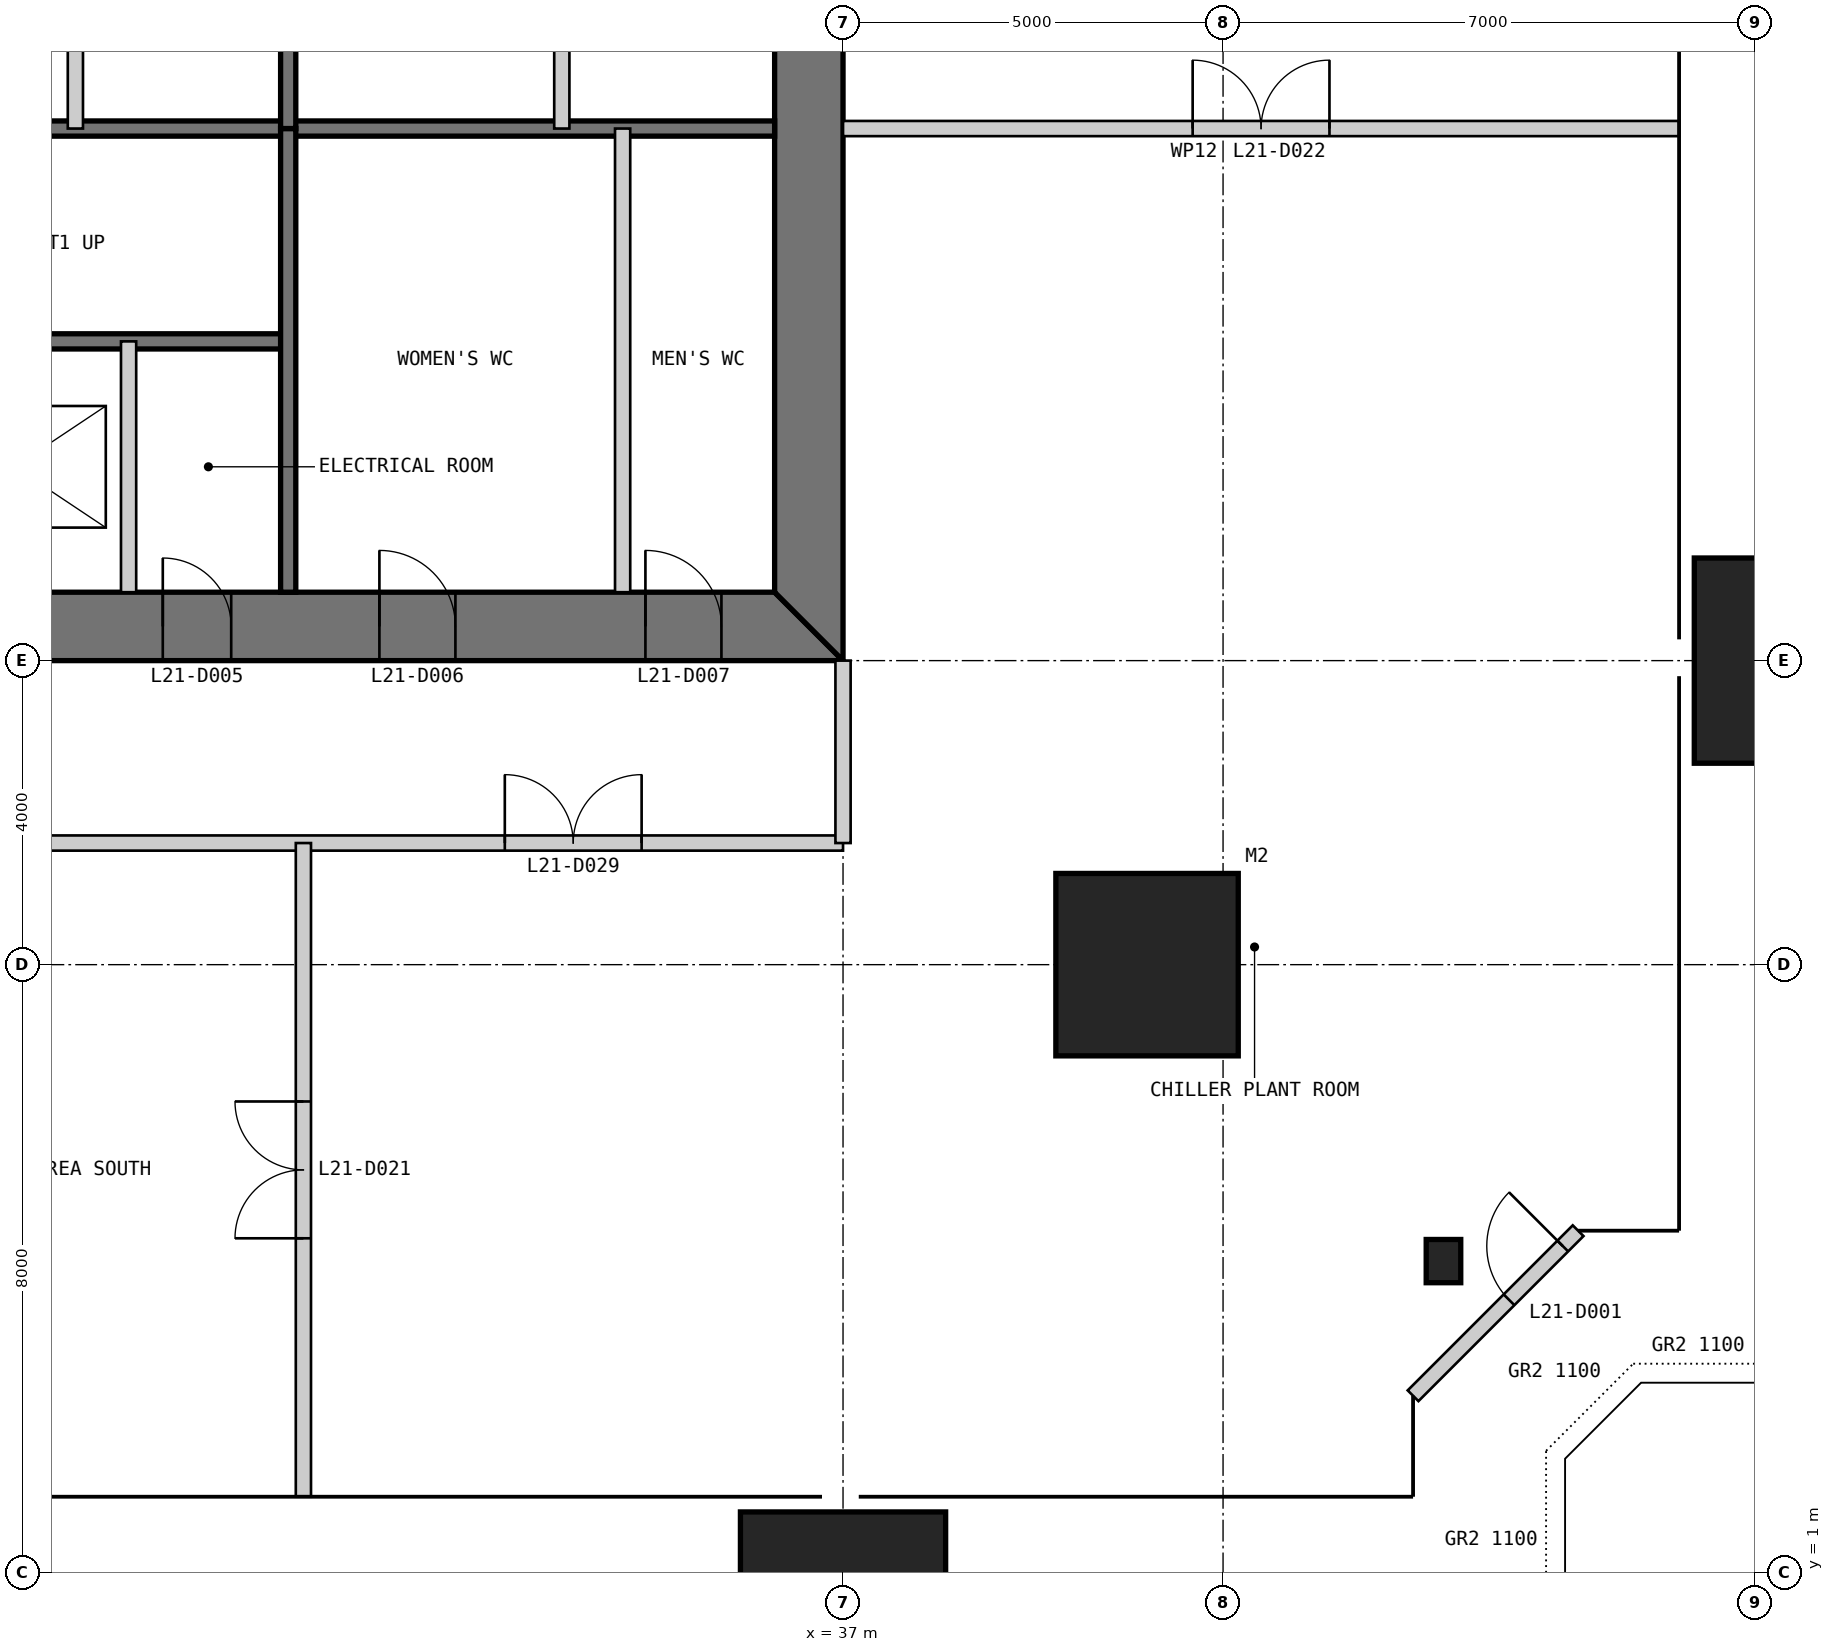
"""IFC4 building model, lengths in metres.
Left out: names, types, materials, properties, quantities, classifications, styles, units other than length and angle.
Written with IfcOpenShell. Run it as: python <this file> out.ifc"""

import sys

from ifc_helpers import new_model, si_unit, direction, frame, frame_2d, origin, origin_2d, place, context, subcontext, project, spatial, polyline, rectangle, i_section, outline, extrude, element, fill, save


model = new_model("IFC4")
c1 = context("Model", 3, precision=1e-05, world=origin(), true_north=direction((0.0, 1.0)))
c2 = subcontext(c1, "Body", "Model", "MODEL_VIEW")
j1 = project(units=[si_unit("LENGTHUNIT", "METRE"), si_unit("PLANEANGLEUNIT", "RADIAN")], contexts=[c1])
p1 = place(None, origin())
s1 = spatial("IfcSite", under=j1, at=p1, CompositionType="ELEMENT")
p2 = place(p1, origin())
s2 = spatial("IfcBuilding", under=s1, at=p2, CompositionType="ELEMENT")
p3 = place(p2, frame((0.0, 0.0, 91.0)))
s3 = spatial("IfcBuildingStorey", under=s2, at=p3, CompositionType="ELEMENT", Elevation=91.0)
p4 = place(p3, frame((41.0, 9.0, 0.0), z_axis=(0.0, 0.0, 1.0), x_axis=(1.0, 0.0, 0.0)))
e1 = element("IfcColumn", 1, at=p4, inside=s3, PredefinedType="COLUMN", context=c2, shape_type="SweptSolid", body=[
    extrude(rectangle(XDim=2.4, YDim=2.4, at=origin_2d()), origin(), (0.0, 0.0, 1.0), 6.0),
])
p5 = place(p3, frame((37.0, 1.0, 0.0), z_axis=(0.0, 0.0, 1.0), x_axis=(1.0, 0.0, 0.0)))
e2 = element("IfcColumn", 2, at=p5, inside=s3, PredefinedType="COLUMN", context=c2, shape_type="SweptSolid", body=[
    extrude(rectangle(XDim=2.7, YDim=1.6, at=origin_2d()), origin(), (0.0, 0.0, 1.0), 6.0),
])
p6 = place(p3, frame((49.0, 13.0, 0.0), z_axis=(0.0, 0.0, 1.0), x_axis=(1.0, 0.0, 0.0)))
e3 = element("IfcColumn", 3, at=p6, inside=s3, PredefinedType="COLUMN", context=c2, shape_type="SweptSolid", body=[
    extrude(rectangle(XDim=1.6, YDim=2.7, at=origin_2d()), origin(), (0.0, 0.0, 1.0), 6.0),
])
p7 = place(p3, frame((44.9, 5.1, 0.0), z_axis=(0.0, 0.0, 1.0), x_axis=(1.0, 0.0, 0.0)))
e4 = element("IfcColumn", 4, at=p7, inside=s3, PredefinedType="COLUMN", context=c2, shape_type="SweptSolid", body=[
    extrude(i_section(OverallWidth=0.455, OverallDepth=0.569, WebThickness=0.078, FlangeThickness=0.125, at=origin_2d()), origin(), (0.0, 0.0, 1.0), 4.6),
])
p8 = place(p3, frame((13.0, 13.45, 0.0), z_axis=(0.0, 0.0, 1.0), x_axis=(1.0, 0.0, 0.0)))
e5 = element("IfcWall", 5, at=p8, inside=s3, PredefinedType="SHEAR", context=c2, shape_type="SweptSolid", body=[
    extrude(outline(polyline([(0.0, -0.45), (24.0, -0.45), (23.1, 0.45), (0.9, 0.45), (0.0, -0.45)])), origin(), (0.0, 0.0, 1.0), 6.0),
])
p9 = place(p8, frame((4.9, 0.0, 0.0)))
e6 = element("IfcOpeningElement", 6, at=p9, cuts=e5, PredefinedType="OPENING", context=c2, shape_type="SweptSolid", body=[
    extrude(rectangle(XDim=1.0, YDim=2.2, at=frame_2d((0.5, 1.1))), frame((0.0, 0.46, 0.0), z_axis=(0.0, -1.0, 0.0), x_axis=(1.0, 0.0, 0.0)), (0.0, 0.0, 1.0), 0.92),
])
p10 = place(p8, frame((8.9, 0.0, 0.0)))
e7 = element("IfcOpeningElement", 7, at=p10, cuts=e5, PredefinedType="OPENING", context=c2, shape_type="SweptSolid", body=[
    extrude(rectangle(XDim=1.1, YDim=2.2, at=frame_2d((0.55, 1.1))), frame((0.0, 0.46, 0.0), z_axis=(0.0, -1.0, 0.0), x_axis=(1.0, 0.0, 0.0)), (0.0, 0.0, 1.0), 0.92),
])
p11 = place(p8, frame((15.05, 0.0, 0.0)))
e8 = element("IfcOpeningElement", 8, at=p11, cuts=e5, PredefinedType="OPENING", context=c2, shape_type="SweptSolid", body=[
    extrude(rectangle(XDim=0.9, YDim=2.2, at=frame_2d((0.45, 1.1))), frame((0.0, 0.46, 0.0), z_axis=(0.0, -1.0, 0.0), x_axis=(1.0, 0.0, 0.0)), (0.0, 0.0, 1.0), 0.92),
])
p12 = place(p8, frame((17.9, 0.0, 0.0)))
e9 = element("IfcOpeningElement", 9, at=p12, cuts=e5, PredefinedType="OPENING", context=c2, shape_type="SweptSolid", body=[
    extrude(rectangle(XDim=1.0, YDim=2.2, at=frame_2d((0.5, 1.1))), frame((0.0, 0.46, 0.0), z_axis=(0.0, -1.0, 0.0), x_axis=(1.0, 0.0, 0.0)), (0.0, 0.0, 1.0), 0.92),
])
p13 = place(p8, frame((21.4, 0.0, 0.0)))
e10 = element("IfcOpeningElement", 10, at=p13, cuts=e5, PredefinedType="OPENING", context=c2, shape_type="SweptSolid", body=[
    extrude(rectangle(XDim=1.0, YDim=2.2, at=frame_2d((0.5, 1.1))), frame((0.0, 0.46, 0.0), z_axis=(0.0, -1.0, 0.0), x_axis=(1.0, 0.0, 0.0)), (0.0, 0.0, 1.0), 0.92),
])
p14 = place(p3, frame((36.55, 13.9, 0.0), z_axis=(0.0, 0.0, 1.0), x_axis=(0.0, 1.0, 0.0)))
e11 = element("IfcWall", 11, at=p14, inside=s3, PredefinedType="SHEAR", context=c2, shape_type="SweptSolid", body=[
    extrude(outline(polyline([(-0.9, -0.45), (23.1, -0.45), (22.2, 0.45), (0.0, 0.45), (-0.9, -0.45)])), origin(), (0.0, 0.0, 1.0), 6.0),
])
p15 = place(p14, frame((20.2, 0.0, 0.0)))
e12 = element("IfcOpeningElement", 12, at=p15, cuts=e11, PredefinedType="OPENING", context=c2, shape_type="SweptSolid", body=[
    extrude(rectangle(XDim=1.0, YDim=2.2, at=frame_2d((0.5, 1.1))), frame((0.0, 0.46, 0.0), z_axis=(0.0, -1.0, 0.0), x_axis=(1.0, 0.0, 0.0)), (0.0, 0.0, 1.0), 0.92),
])
p16 = place(p14, frame((17.25, 0.0, 0.0)))
e13 = element("IfcOpeningElement", 13, at=p16, cuts=e11, PredefinedType="OPENING", context=c2, shape_type="SweptSolid", body=[
    extrude(rectangle(XDim=0.9, YDim=2.2, at=frame_2d((0.45, 1.1))), frame((0.0, 0.46, 0.0), z_axis=(0.0, -1.0, 0.0), x_axis=(1.0, 0.0, 0.0)), (0.0, 0.0, 1.0), 0.92),
])
p17 = place(p3, frame((44.5, 3.328, 0.0), z_axis=(0.0, 0.0, 1.0), x_axis=(0.707106781187, 0.707106781187, 0.0)))
e14 = element("IfcWall", 14, at=p17, inside=s3, PredefinedType="SOLIDWALL", context=c2, shape_type="SweptSolid", body=[
    extrude(rectangle(XDim=3.071, YDim=0.2, at=frame_2d((1.536, 0.0))), origin(), (0.0, 0.0, 1.0), 4.6),
])
p18 = place(p17, frame((1.786, 0.0, 0.0)))
e15 = element("IfcOpeningElement", 15, at=p18, cuts=e14, PredefinedType="OPENING", context=c2, shape_type="SweptSolid", body=[
    extrude(rectangle(XDim=1.0, YDim=2.2, at=frame_2d((0.5, 1.1))), frame((0.0, 0.11, 0.0), z_axis=(0.0, -1.0, 0.0), x_axis=(1.0, 0.0, 0.0)), (0.0, 0.0, 1.0), 0.22),
])
p19 = place(p3, frame((20.3, 17.2, 0.0), z_axis=(0.0, 0.0, 1.0), x_axis=(1.0, 0.0, 0.0)))
e16 = element("IfcWall", 16, at=p19, inside=s3, PredefinedType="SOLIDWALL", context=c2, shape_type="SweptSolid", body=[
    extrude(rectangle(XDim=9.4, YDim=0.2, at=frame_2d((4.7, 0.0))), origin(), (0.0, 0.0, 1.0), 5.8),
])
p20 = place(p19, frame((0.25, 0.0, 0.0)))
e17 = element("IfcOpeningElement", 17, at=p20, cuts=e16, PredefinedType="OPENING", context=c2, shape_type="SweptSolid", body=[
    extrude(rectangle(XDim=1.0, YDim=2.2, at=frame_2d((0.5, 1.1))), frame((0.0, 0.11, 0.0), z_axis=(0.0, -1.0, 0.0), x_axis=(1.0, 0.0, 0.0)), (0.0, 0.0, 1.0), 0.22),
])
p21 = place(p3, frame((20.3, 20.0, 0.0), z_axis=(0.0, 0.0, 1.0), x_axis=(1.0, 0.0, 0.0)))
e18 = element("IfcWall", 18, at=p21, inside=s3, PredefinedType="SOLIDWALL", context=c2, shape_type="SweptSolid", body=[
    extrude(rectangle(XDim=15.8, YDim=0.2, at=frame_2d((7.9, 0.0))), origin(), (0.0, 0.0, 1.0), 5.8),
])
p22 = place(p3, frame((27.6, 13.9, 0.0), z_axis=(0.0, 0.0, 1.0), x_axis=(0.0, 1.0, 0.0)))
e19 = element("IfcWall", 19, at=p22, inside=s3, PredefinedType="PARTITIONING", context=c2, shape_type="SweptSolid", body=[
    extrude(rectangle(XDim=3.3, YDim=0.2, at=frame_2d((1.65, 0.0))), origin(), (0.0, 0.0, 1.0), 5.8),
])
p23 = place(p3, frame((29.7, 13.9, 0.0), z_axis=(0.0, 0.0, 1.0), x_axis=(0.0, 1.0, 0.0)))
e20 = element("IfcWall", 20, at=p23, inside=s3, PredefinedType="SOLIDWALL", context=c2, shape_type="SweptSolid", body=[
    extrude(rectangle(XDim=6.1, YDim=0.2, at=frame_2d((3.05, 0.0))), origin(), (0.0, 0.0, 1.0), 5.8),
])
p24 = place(p3, frame((34.1, 13.9, 0.0), z_axis=(0.0, 0.0, 1.0), x_axis=(0.0, 1.0, 0.0)))
e21 = element("IfcWall", 21, at=p24, inside=s3, PredefinedType="PARTITIONING", context=c2, shape_type="SweptSolid", body=[
    extrude(rectangle(XDim=6.1, YDim=0.2, at=frame_2d((3.05, 0.0))), origin(), (0.0, 0.0, 1.0), 5.8),
])
p25 = place(p3, frame((33.3, 36.1, 0.0), z_axis=(0.0, 0.0, 1.0), x_axis=(0.0, -1.0, 0.0)))
e22 = element("IfcWall", 22, at=p25, inside=s3, PredefinedType="PARTITIONING", context=c2, shape_type="SweptSolid", body=[
    extrude(rectangle(XDim=16.1, YDim=0.2, at=frame_2d((8.05, 0.0))), origin(), (0.0, 0.0, 1.0), 5.8),
])
p26 = place(p25, frame((4.1, 0.0, 0.0)))
e23 = element("IfcOpeningElement", 23, at=p26, cuts=e22, PredefinedType="OPENING", context=c2, shape_type="SweptSolid", body=[
    extrude(rectangle(XDim=0.9, YDim=2.2, at=frame_2d((0.45, 1.1))), frame((0.0, 0.11, 0.0), z_axis=(0.0, -1.0, 0.0), x_axis=(1.0, 0.0, 0.0)), (0.0, 0.0, 1.0), 0.22),
])
p27 = place(p3, frame((29.7, 36.1, 0.0), z_axis=(0.0, 0.0, 1.0), x_axis=(0.0, -1.0, 0.0)))
e24 = element("IfcWall", 24, at=p27, inside=s3, PredefinedType="SOLIDWALL", context=c2, shape_type="SweptSolid", body=[
    extrude(rectangle(XDim=16.1, YDim=0.2, at=frame_2d((8.05, 0.0))), origin(), (0.0, 0.0, 1.0), 5.8),
])
p28 = place(p3, frame((26.9, 30.0, 0.0), z_axis=(0.0, 0.0, 1.0), x_axis=(0.0, -1.0, 0.0)))
e25 = element("IfcWall", 25, at=p28, inside=s3, PredefinedType="PARTITIONING", context=c2, shape_type="SweptSolid", body=[
    extrude(rectangle(XDim=10.0, YDim=0.2, at=frame_2d((5.0, 0.0))), origin(), (0.0, 0.0, 1.0), 5.8),
])
p29 = place(p3, frame((13.0, 10.6, 0.0), z_axis=(0.0, 0.0, 1.0), x_axis=(1.0, 0.0, 0.0)))
e26 = element("IfcWall", 26, at=p29, inside=s3, PredefinedType="PARTITIONING", context=c2, shape_type="SweptSolid", body=[
    extrude(rectangle(XDim=24.0, YDim=0.2, at=frame_2d((12.0, 0.0))), origin(), (0.0, 0.0, 1.0), 5.8),
])
p30 = place(p29, frame((2.8, 0.0, 0.0)))
e27 = element("IfcOpeningElement", 27, at=p30, cuts=e26, PredefinedType="OPENING", context=c2, shape_type="SweptSolid", body=[
    extrude(rectangle(XDim=1.8, YDim=2.4, at=frame_2d((0.9, 1.2))), frame((0.0, 0.11, 0.0), z_axis=(0.0, -1.0, 0.0), x_axis=(1.0, 0.0, 0.0)), (0.0, 0.0, 1.0), 0.22),
])
p31 = place(p29, frame((11.25, 0.0, 0.0)))
e28 = element("IfcOpeningElement", 28, at=p31, cuts=e26, PredefinedType="OPENING", context=c2, shape_type="SweptSolid", body=[
    extrude(rectangle(XDim=1.8, YDim=2.4, at=frame_2d((0.9, 1.2))), frame((0.0, 0.11, 0.0), z_axis=(0.0, -1.0, 0.0), x_axis=(1.0, 0.0, 0.0)), (0.0, 0.0, 1.0), 0.22),
])
p32 = place(p29, frame((19.55, 0.0, 0.0)))
e29 = element("IfcOpeningElement", 29, at=p32, cuts=e26, PredefinedType="OPENING", context=c2, shape_type="SweptSolid", body=[
    extrude(rectangle(XDim=1.8, YDim=2.4, at=frame_2d((0.9, 1.2))), frame((0.0, 0.11, 0.0), z_axis=(0.0, -1.0, 0.0), x_axis=(1.0, 0.0, 0.0)), (0.0, 0.0, 1.0), 0.22),
])
p33 = place(p3, frame((37.0, 10.6, 0.0), z_axis=(0.0, 0.0, 1.0), x_axis=(0.0, 1.0, 0.0)))
e30 = element("IfcWall", 30, at=p33, inside=s3, PredefinedType="PARTITIONING", context=c2, shape_type="SweptSolid", body=[
    extrude(rectangle(XDim=2.4, YDim=0.2, at=frame_2d((1.2, 0.0))), origin(), (0.0, 0.0, 1.0), 4.853),
])
p34 = place(p3, frame((29.9, 2.0, 0.0), z_axis=(0.0, 0.0, 1.0), x_axis=(0.0, 1.0, 0.0)))
e31 = element("IfcWall", 31, at=p34, inside=s3, PredefinedType="PARTITIONING", context=c2, shape_type="SweptSolid", body=[
    extrude(rectangle(XDim=8.6, YDim=0.2, at=frame_2d((4.3, 0.0))), origin(), (0.0, 0.0, 1.0), 5.8),
])
p35 = place(p34, frame((3.4, 0.0, 0.0)))
e32 = element("IfcOpeningElement", 32, at=p35, cuts=e31, PredefinedType="OPENING", context=c2, shape_type="SweptSolid", body=[
    extrude(rectangle(XDim=1.8, YDim=2.4, at=frame_2d((0.9, 1.2))), frame((0.0, 0.11, 0.0), z_axis=(0.0, -1.0, 0.0), x_axis=(1.0, 0.0, 0.0)), (0.0, 0.0, 1.0), 0.22),
])
p36 = place(p3, frame((37.0, 20.0, 0.0), z_axis=(0.0, 0.0, 1.0), x_axis=(1.0, 0.0, 0.0)))
e33 = element("IfcWall", 33, at=p36, inside=s3, PredefinedType="PARTITIONING", context=c2, shape_type="SweptSolid", body=[
    extrude(rectangle(XDim=11.0, YDim=0.2, at=frame_2d((5.5, 0.0))), origin(), (0.0, 0.0, 1.0), 5.8),
])
p37 = place(p36, frame((4.6, 0.0, 0.0)))
e34 = element("IfcOpeningElement", 34, at=p37, cuts=e33, PredefinedType="OPENING", context=c2, shape_type="SweptSolid", body=[
    extrude(rectangle(XDim=1.8, YDim=2.4, at=frame_2d((0.9, 1.2))), frame((0.0, 0.11, 0.0), z_axis=(0.0, -1.0, 0.0), x_axis=(1.0, 0.0, 0.0)), (0.0, 0.0, 1.0), 0.22),
])
p38 = place(p18, origin())
e35 = element("IfcDoor", 35, at=p38, inside=s3, OperationType="SINGLE_SWING_RIGHT", PredefinedType="DOOR", context=c2, shape_type="SweptSolid", body=[
    extrude(rectangle(XDim=1.0, YDim=2.2, at=frame_2d((0.5, 1.1))), frame((0.0, 0.025, 0.0), z_axis=(0.0, -1.0, 0.0), x_axis=(1.0, 0.0, 0.0)), (0.0, 0.0, 1.0), 0.05),
])
fill(e15, e35)
p39 = place(p11, origin())
e36 = element("IfcDoor", 36, at=p39, inside=s3, OperationType="SINGLE_SWING_LEFT", PredefinedType="DOOR", context=c2, shape_type="SweptSolid", body=[
    extrude(rectangle(XDim=0.9, YDim=2.2, at=frame_2d((0.45, 1.1))), frame((0.0, 0.025, 0.0), z_axis=(0.0, -1.0, 0.0), x_axis=(1.0, 0.0, 0.0)), (0.0, 0.0, 1.0), 0.05),
    extrude(outline(polyline([(0.0, 0.0), (0.04, 0.0), (0.04, 2.16), (0.86, 2.16), (0.86, 0.0), (0.9, 0.0), (0.9, 2.2), (0.0, 2.2), (0.0, 0.0)])), frame((0.0, 0.3, 0.0), z_axis=(0.0, -1.0, 0.0), x_axis=(1.0, 0.0, 0.0)), (0.0, 0.0, 1.0), 0.6),
])
fill(e8, e36)
p40 = place(p12, origin())
e37 = element("IfcDoor", 37, at=p40, inside=s3, OperationType="SINGLE_SWING_LEFT", PredefinedType="DOOR", context=c2, shape_type="SweptSolid", body=[
    extrude(rectangle(XDim=1.0, YDim=2.2, at=frame_2d((0.5, 1.1))), frame((0.0, 0.025, 0.0), z_axis=(0.0, -1.0, 0.0), x_axis=(1.0, 0.0, 0.0)), (0.0, 0.0, 1.0), 0.05),
    extrude(outline(polyline([(0.0, 0.0), (0.04, 0.0), (0.04, 2.16), (0.96, 2.16), (0.96, 0.0), (1.0, 0.0), (1.0, 2.2), (0.0, 2.2), (0.0, 0.0)])), frame((0.0, 0.3, 0.0), z_axis=(0.0, -1.0, 0.0), x_axis=(1.0, 0.0, 0.0)), (0.0, 0.0, 1.0), 0.6),
])
fill(e9, e37)
p41 = place(p13, origin())
e38 = element("IfcDoor", 38, at=p41, inside=s3, OperationType="SINGLE_SWING_LEFT", PredefinedType="DOOR", context=c2, shape_type="SweptSolid", body=[
    extrude(rectangle(XDim=1.0, YDim=2.2, at=frame_2d((0.5, 1.1))), frame((0.0, 0.025, 0.0), z_axis=(0.0, -1.0, 0.0), x_axis=(1.0, 0.0, 0.0)), (0.0, 0.0, 1.0), 0.05),
    extrude(outline(polyline([(0.0, 0.0), (0.04, 0.0), (0.04, 2.16), (0.96, 2.16), (0.96, 0.0), (1.0, 0.0), (1.0, 2.2), (0.0, 2.2), (0.0, 0.0)])), frame((0.0, 0.3, 0.0), z_axis=(0.0, -1.0, 0.0), x_axis=(1.0, 0.0, 0.0)), (0.0, 0.0, 1.0), 0.6),
])
fill(e10, e38)
p42 = place(p35, origin())
e39 = element("IfcDoor", 39, at=p42, inside=s3, OperationType="DOUBLE_DOOR_SINGLE_SWING", PredefinedType="DOOR", context=c2, shape_type="SweptSolid", body=[
    extrude(rectangle(XDim=1.8, YDim=2.4, at=frame_2d((0.9, 1.2))), frame((0.0, 0.025, 0.0), z_axis=(0.0, -1.0, 0.0), x_axis=(1.0, 0.0, 0.0)), (0.0, 0.0, 1.0), 0.05),
])
fill(e32, e39)
p43 = place(p37, origin())
e40 = element("IfcDoor", 40, at=p43, inside=s3, OperationType="DOUBLE_DOOR_SINGLE_SWING", PredefinedType="DOOR", context=c2, shape_type="SweptSolid", body=[
    extrude(rectangle(XDim=1.8, YDim=2.4, at=frame_2d((0.9, 1.2))), frame((0.0, 0.025, 0.0), z_axis=(0.0, -1.0, 0.0), x_axis=(1.0, 0.0, 0.0)), (0.0, 0.0, 1.0), 0.05),
])
fill(e34, e40)
p44 = place(p32, origin())
e41 = element("IfcDoor", 41, at=p44, inside=s3, OperationType="DOUBLE_DOOR_SINGLE_SWING", PredefinedType="DOOR", context=c2, shape_type="SweptSolid", body=[
    extrude(rectangle(XDim=1.8, YDim=2.4, at=frame_2d((0.9, 1.2))), frame((0.0, 0.025, 0.0), z_axis=(0.0, -1.0, 0.0), x_axis=(1.0, 0.0, 0.0)), (0.0, 0.0, 1.0), 0.05),
])
fill(e29, e41)
save(model, sys.argv[1])
